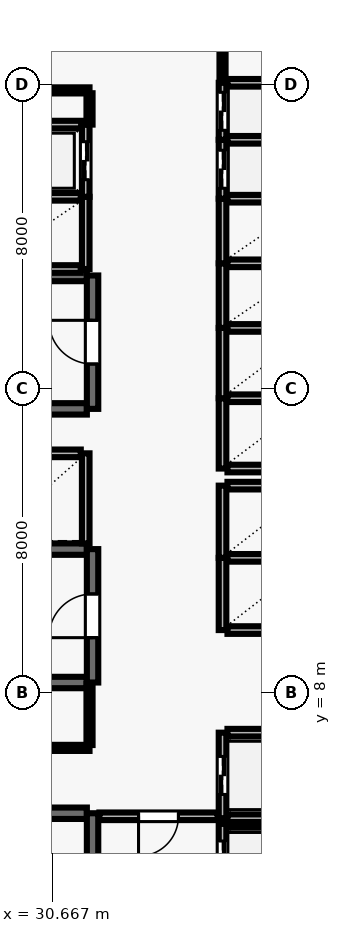
"""IFC4 building model, lengths in metres.
Left out: names, types, materials, properties, quantities, classifications, styles, units other than length and angle.
Written with IfcOpenShell. Run it as: python <this file> out.ifc"""

import sys

from ifc_helpers import new_model, si_unit, direction, frame, frame_2d, origin, place, context, subcontext, project, spatial, rectangle, extrude, element, fill, save


model = new_model("IFC4")
c1 = context("Model", 3, precision=1e-05, world=origin(), true_north=direction((0.0, 1.0)))
c2 = subcontext(c1, "Body", "Model", "MODEL_VIEW")
j1 = project(units=[si_unit("LENGTHUNIT", "METRE"), si_unit("PLANEANGLEUNIT", "RADIAN")], contexts=[c1])
p1 = place(None, origin())
s1 = spatial("IfcSite", under=j1, at=p1, CompositionType="ELEMENT")
p2 = place(p1, origin())
s2 = spatial("IfcBuilding", under=s1, at=p2, CompositionType="ELEMENT")
p3 = place(p2, frame((0.0, 0.0, 46.6)))
s3 = spatial("IfcBuildingStorey", under=s2, at=p3, CompositionType="ELEMENT", Elevation=46.6)
p4 = place(p3, frame((31.58, 4.83, 0.0), z_axis=(0.0, 0.0, 1.0), x_axis=(-1.0, 0.0, 0.0)))
e1 = element("IfcWall", 1, at=p4, inside=s3, PredefinedType="SHEAR", context=c2, shape_type="SweptSolid", body=[
    extrude(rectangle(XDim=8.36, YDim=0.3, at=frame_2d((4.18, 0.0))), origin(), (0.0, 0.0, 1.0), 3.69),
])
p5 = place(p3, frame((31.73, 0.96, 0.0), z_axis=(0.0, 0.0, 1.0), x_axis=(0.0, 1.0, 0.0)))
e2 = element("IfcWall", 2, at=p5, inside=s3, PredefinedType="SHEAR", context=c2, shape_type="SweptSolid", body=[
    extrude(rectangle(XDim=3.87, YDim=0.3, at=frame_2d((1.935, 0.0))), origin(), (0.0, 0.0, 1.0), 3.69),
])
p6 = place(p5, frame((1.54, 0.0, 0.0)))
e3 = element("IfcOpeningElement", 3, at=p6, cuts=e2, PredefinedType="OPENING", context=c2, shape_type="SweptSolid", body=[
    extrude(rectangle(XDim=1.15, YDim=2.15, at=frame_2d((0.575, 1.075))), frame((0.0, 0.16, 0.0), z_axis=(0.0, -1.0, 0.0), x_axis=(1.0, 0.0, 0.0)), (0.0, 0.0, 1.0), 0.32),
])
for number, where, z_axis, x_axis in (
    (4, (31.58, 18.98, 0.0), (0.0, 0.0, 1.0), (-1.0, 0.0, 0.0)),
    (5, (23.22, 15.47, 0.0), (0.0, 0.0, 1.0), (1.0, 0.0, 0.0)),
):
    element("IfcWall", number, at=place(p3, frame(where, z_axis=z_axis, x_axis=x_axis)), inside=s3, PredefinedType="SHEAR", context=c2, shape_type="SweptSolid", body=[
        extrude(rectangle(XDim=8.36, YDim=0.3, at=frame_2d((4.18, 0.0))), origin(), (0.0, 0.0, 1.0), 3.69),
    ])
p7 = place(p3, frame((31.73, 15.47, 0.0), z_axis=(0.0, 0.0, 1.0), x_axis=(0.0, 1.0, 0.0)))
e6 = element("IfcWall", 6, at=p7, inside=s3, PredefinedType="SHEAR", context=c2, shape_type="SweptSolid", body=[
    extrude(rectangle(XDim=3.51, YDim=0.3, at=frame_2d((1.755, 0.0))), origin(), (0.0, 0.0, 1.0), 3.69),
])
p8 = place(p7, frame((1.18, 0.0, 0.0)))
e7 = element("IfcOpeningElement", 7, at=p8, cuts=e6, PredefinedType="OPENING", context=c2, shape_type="SweptSolid", body=[
    extrude(rectangle(XDim=1.15, YDim=2.15, at=frame_2d((0.575, 1.075))), frame((0.0, 0.16, 0.0), z_axis=(0.0, -1.0, 0.0), x_axis=(1.0, 0.0, 0.0)), (0.0, 0.0, 1.0), 0.32),
])
for number, where, z_axis, x_axis in (
    (8, (31.58, 11.78, 0.0), (0.0, 0.0, 1.0), (-1.0, 0.0, 0.0)),
    (9, (23.22, 8.27, 0.0), (0.0, 0.0, 1.0), (1.0, 0.0, 0.0)),
):
    element("IfcWall", number, at=place(p3, frame(where, z_axis=z_axis, x_axis=x_axis)), inside=s3, PredefinedType="SHEAR", context=c2, shape_type="SweptSolid", body=[
        extrude(rectangle(XDim=8.36, YDim=0.3, at=frame_2d((4.18, 0.0))), origin(), (0.0, 0.0, 1.0), 3.69),
    ])
p9 = place(p3, frame((31.73, 8.27, 0.0), z_axis=(0.0, 0.0, 1.0), x_axis=(0.0, 1.0, 0.0)))
e10 = element("IfcWall", 10, at=p9, inside=s3, PredefinedType="SHEAR", context=c2, shape_type="SweptSolid", body=[
    extrude(rectangle(XDim=3.51, YDim=0.3, at=frame_2d((1.755, 0.0))), origin(), (0.0, 0.0, 1.0), 3.69),
])
p10 = place(p9, frame((1.18, 0.0, 0.0)))
e11 = element("IfcOpeningElement", 11, at=p10, cuts=e10, PredefinedType="OPENING", context=c2, shape_type="SweptSolid", body=[
    extrude(rectangle(XDim=1.15, YDim=2.15, at=frame_2d((0.575, 1.075))), frame((0.0, 0.16, 0.0), z_axis=(0.0, -1.0, 0.0), x_axis=(1.0, 0.0, 0.0)), (0.0, 0.0, 1.0), 0.32),
])
p11 = place(p3, frame((35.15, 4.55, 0.0), z_axis=(0.0, 0.0, 1.0), x_axis=(0.0, -1.0, 0.0)))
e12 = element("IfcWall", 12, at=p11, inside=s3, PredefinedType="SOLIDWALL", context=c2, shape_type="SweptSolid", body=[
    extrude(rectangle(XDim=2.1, YDim=0.2, at=frame_2d((1.05, 0.0))), origin(), (0.0, 0.0, 1.0), 3.69),
])
p12 = place(p11, frame((0.45, 0.0, 0.0)))
e13 = element("IfcOpeningElement", 13, at=p12, cuts=e12, PredefinedType="OPENING", context=c2, shape_type="SweptSolid", body=[
    extrude(rectangle(XDim=1.2, YDim=2.15, at=frame_2d((0.6, 1.075))), frame((0.0, 0.11, 0.0), z_axis=(0.0, -1.0, 0.0), x_axis=(1.0, 0.0, 0.0)), (0.0, 0.0, 1.0), 0.22),
])
p13 = place(p3, frame((37.42, 4.55, 0.0), z_axis=(0.0, 0.0, 1.0), x_axis=(-1.0, 0.0, 0.0)))
e14 = element("IfcWall", 14, at=p13, inside=s3, PredefinedType="SOLIDWALL", context=c2, shape_type="SweptSolid", body=[
    extrude(rectangle(XDim=2.14, YDim=0.2, at=frame_2d((1.07, 0.0))), origin(), (0.0, 0.0, 1.0), 3.69),
])
p14 = place(p3, frame((35.15, 6.95, 0.0), z_axis=(0.0, 0.0, 1.0), x_axis=(0.0, -1.0, 0.0)))
e15 = element("IfcWall", 15, at=p14, inside=s3, PredefinedType="SOLIDWALL", context=c2, shape_type="SweptSolid", body=[
    extrude(rectangle(XDim=2.25, YDim=0.2, at=frame_2d((1.125, 0.0))), origin(), (0.0, 0.0, 1.0), 3.69),
])
p15 = place(p14, frame((0.625, 0.0, 0.0)))
e16 = element("IfcOpeningElement", 16, at=p15, cuts=e15, PredefinedType="OPENING", context=c2, shape_type="SweptSolid", body=[
    extrude(rectangle(XDim=1.0, YDim=2.1, at=frame_2d((0.5, 1.05))), frame((0.0, 0.11, 0.0), z_axis=(0.0, -1.0, 0.0), x_axis=(1.0, 0.0, 0.0)), (0.0, 0.0, 1.0), 0.22),
])
for number, where, z_axis, x_axis in (
    (17, (35.28, 4.7, 0.0), (0.0, 0.0, 1.0), (1.0, 0.0, 0.0)),
    (18, (37.42, 6.95, 0.0), (0.0, 0.0, 1.0), (-1.0, 0.0, 0.0)),
):
    element("IfcWall", number, at=place(p3, frame(where, z_axis=z_axis, x_axis=x_axis)), inside=s3, PredefinedType="SOLIDWALL", context=c2, shape_type="SweptSolid", body=[
        extrude(rectangle(XDim=2.14, YDim=0.2, at=frame_2d((1.07, 0.0))), origin(), (0.0, 0.0, 1.0), 3.69),
    ])
p16 = place(p3, frame((35.15, 11.55, 0.0), z_axis=(0.0, 0.0, 1.0), x_axis=(0.0, -1.0, 0.0)))
e19 = element("IfcWall", 19, at=p16, inside=s3, PredefinedType="SOLIDWALL", context=c2, shape_type="SweptSolid", body=[
    extrude(rectangle(XDim=1.9, YDim=0.2, at=frame_2d((0.95, 0.0))), origin(), (0.0, 0.0, 1.0), 3.69),
])
for number, where, z_axis, x_axis in (
    (20, (35.28, 9.65, 0.0), (0.0, 0.0, 1.0), (1.0, 0.0, 0.0)),
    (21, (37.42, 11.55, 0.0), (0.0, 0.0, 1.0), (-1.0, 0.0, 0.0)),
):
    element("IfcWall", number, at=place(p3, frame(where, z_axis=z_axis, x_axis=x_axis)), inside=s3, PredefinedType="SOLIDWALL", context=c2, shape_type="SweptSolid", body=[
        extrude(rectangle(XDim=2.14, YDim=0.2, at=frame_2d((1.07, 0.0))), origin(), (0.0, 0.0, 1.0), 3.69),
    ])
p17 = place(p3, frame((35.15, 13.45, 0.0), z_axis=(0.0, 0.0, 1.0), x_axis=(0.0, -1.0, 0.0)))
e22 = element("IfcWall", 22, at=p17, inside=s3, PredefinedType="SOLIDWALL", context=c2, shape_type="SweptSolid", body=[
    extrude(rectangle(XDim=1.9, YDim=0.2, at=frame_2d((0.95, 0.0))), origin(), (0.0, 0.0, 1.0), 3.69),
])
p18 = place(p3, frame((37.42, 13.45, 0.0), z_axis=(0.0, 0.0, 1.0), x_axis=(-1.0, 0.0, 0.0)))
e23 = element("IfcWall", 23, at=p18, inside=s3, PredefinedType="SOLIDWALL", context=c2, shape_type="SweptSolid", body=[
    extrude(rectangle(XDim=2.14, YDim=0.2, at=frame_2d((1.07, 0.0))), origin(), (0.0, 0.0, 1.0), 3.69),
])
p19 = place(p3, frame((31.55, 11.93, 0.0), z_axis=(0.0, 0.0, 1.0), x_axis=(0.0, 1.0, 0.0)))
e24 = element("IfcWall", 24, at=p19, inside=s3, PredefinedType="SOLIDWALL", context=c2, shape_type="SweptSolid", body=[
    extrude(rectangle(XDim=2.37, YDim=0.2, at=frame_2d((1.185, 0.0))), origin(), (0.0, 0.0, 1.0), 3.69),
])
p20 = place(p3, frame((31.42, 14.3, 0.0), z_axis=(0.0, 0.0, 1.0), x_axis=(-1.0, 0.0, 0.0)))
e25 = element("IfcWall", 25, at=p20, inside=s3, PredefinedType="SOLIDWALL", context=c2, shape_type="SweptSolid", body=[
    extrude(rectangle(XDim=2.44, YDim=0.2, at=frame_2d((1.22, 0.0))), origin(), (0.0, 0.0, 1.0), 3.69),
])
p21 = place(p3, frame((35.15, 15.75, 0.0), z_axis=(0.0, 0.0, 1.0), x_axis=(0.0, -1.0, 0.0)))
e26 = element("IfcWall", 26, at=p21, inside=s3, PredefinedType="SOLIDWALL", context=c2, shape_type="SweptSolid", body=[
    extrude(rectangle(XDim=1.85, YDim=0.2, at=frame_2d((0.925, 0.0))), origin(), (0.0, 0.0, 1.0), 3.69),
])
for number, where, z_axis, x_axis in (
    (27, (35.28, 13.9, 0.0), (0.0, 0.0, 1.0), (1.0, 0.0, 0.0)),
    (28, (37.42, 15.75, 0.0), (0.0, 0.0, 1.0), (-1.0, 0.0, 0.0)),
):
    element("IfcWall", number, at=place(p3, frame(where, z_axis=z_axis, x_axis=x_axis)), inside=s3, PredefinedType="SOLIDWALL", context=c2, shape_type="SweptSolid", body=[
        extrude(rectangle(XDim=2.14, YDim=0.2, at=frame_2d((1.07, 0.0))), origin(), (0.0, 0.0, 1.0), 3.69),
    ])
p22 = place(p3, frame((35.15, 17.6, 0.0), z_axis=(0.0, 0.0, 1.0), x_axis=(0.0, -1.0, 0.0)))
e29 = element("IfcWall", 29, at=p22, inside=s3, PredefinedType="SOLIDWALL", context=c2, shape_type="SweptSolid", body=[
    extrude(rectangle(XDim=1.85, YDim=0.2, at=frame_2d((0.925, 0.0))), origin(), (0.0, 0.0, 1.0), 3.69),
])
p23 = place(p3, frame((37.42, 17.6, 0.0), z_axis=(0.0, 0.0, 1.0), x_axis=(-1.0, 0.0, 0.0)))
e30 = element("IfcWall", 30, at=p23, inside=s3, PredefinedType="SOLIDWALL", context=c2, shape_type="SweptSolid", body=[
    extrude(rectangle(XDim=2.14, YDim=0.2, at=frame_2d((1.07, 0.0))), origin(), (0.0, 0.0, 1.0), 3.69),
])
p24 = place(p3, frame((35.15, 19.3, 0.0), z_axis=(0.0, 0.0, 1.0), x_axis=(0.0, -1.0, 0.0)))
e31 = element("IfcWall", 31, at=p24, inside=s3, PredefinedType="SOLIDWALL", context=c2, shape_type="SweptSolid", body=[
    extrude(rectangle(XDim=1.7, YDim=0.2, at=frame_2d((0.85, 0.0))), origin(), (0.0, 0.0, 1.0), 3.69),
])
p25 = place(p3, frame((37.42, 19.3, 0.0), z_axis=(0.0, 0.0, 1.0), x_axis=(-1.0, 0.0, 0.0)))
e32 = element("IfcWall", 32, at=p25, inside=s3, PredefinedType="SOLIDWALL", context=c2, shape_type="SweptSolid", body=[
    extrude(rectangle(XDim=2.14, YDim=0.2, at=frame_2d((1.07, 0.0))), origin(), (0.0, 0.0, 1.0), 3.69),
])
p26 = place(p3, frame((35.15, 21.0, 0.0), z_axis=(0.0, 0.0, 1.0), x_axis=(0.0, -1.0, 0.0)))
e33 = element("IfcWall", 33, at=p26, inside=s3, PredefinedType="SOLIDWALL", context=c2, shape_type="SweptSolid", body=[
    extrude(rectangle(XDim=1.7, YDim=0.2, at=frame_2d((0.85, 0.0))), origin(), (0.0, 0.0, 1.0), 3.69),
])
p27 = place(p3, frame((37.42, 21.0, 0.0), z_axis=(0.0, 0.0, 1.0), x_axis=(-1.0, 0.0, 0.0)))
e34 = element("IfcWall", 34, at=p27, inside=s3, PredefinedType="SOLIDWALL", context=c2, shape_type="SweptSolid", body=[
    extrude(rectangle(XDim=2.14, YDim=0.2, at=frame_2d((1.07, 0.0))), origin(), (0.0, 0.0, 1.0), 3.69),
])
p28 = place(p3, frame((31.55, 19.15, 0.0), z_axis=(0.0, 0.0, 1.0), x_axis=(0.0, 1.0, 0.0)))
e35 = element("IfcWall", 35, at=p28, inside=s3, PredefinedType="SOLIDWALL", context=c2, shape_type="SweptSolid", body=[
    extrude(rectangle(XDim=1.9, YDim=0.2, at=frame_2d((0.95, 0.0))), origin(), (0.0, 0.0, 1.0), 3.69),
])
for number, where, z_axis, x_axis in (
    (36, (28.98, 19.15, 0.0), (0.0, 0.0, 1.0), (1.0, 0.0, 0.0)),
    (37, (31.42, 21.05, 0.0), (0.0, 0.0, 1.0), (-1.0, 0.0, 0.0)),
):
    element("IfcWall", number, at=place(p3, frame(where, z_axis=z_axis, x_axis=x_axis)), inside=s3, PredefinedType="SOLIDWALL", context=c2, shape_type="SweptSolid", body=[
        extrude(rectangle(XDim=2.44, YDim=0.2, at=frame_2d((1.22, 0.0))), origin(), (0.0, 0.0, 1.0), 3.69),
    ])
p29 = place(p3, frame((35.15, 22.55, 0.0), z_axis=(0.0, 0.0, 1.0), x_axis=(0.0, -1.0, 0.0)))
e38 = element("IfcWall", 38, at=p29, inside=s3, PredefinedType="SOLIDWALL", context=c2, shape_type="SweptSolid", body=[
    extrude(rectangle(XDim=1.55, YDim=0.2, at=frame_2d((0.775, 0.0))), origin(), (0.0, 0.0, 1.0), 3.69),
])
p30 = place(p29, frame((0.275, 0.0, 0.0)))
e39 = element("IfcOpeningElement", 39, at=p30, cuts=e38, PredefinedType="OPENING", context=c2, shape_type="SweptSolid", body=[
    extrude(rectangle(XDim=1.0, YDim=2.1, at=frame_2d((0.5, 1.05))), frame((0.0, 0.11, 0.0), z_axis=(0.0, -1.0, 0.0), x_axis=(1.0, 0.0, 0.0)), (0.0, 0.0, 1.0), 0.22),
])
p31 = place(p3, frame((37.42, 22.55, 0.0), z_axis=(0.0, 0.0, 1.0), x_axis=(-1.0, 0.0, 0.0)))
e40 = element("IfcWall", 40, at=p31, inside=s3, PredefinedType="SOLIDWALL", context=c2, shape_type="SweptSolid", body=[
    extrude(rectangle(XDim=2.14, YDim=0.2, at=frame_2d((1.07, 0.0))), origin(), (0.0, 0.0, 1.0), 3.69),
])
p32 = place(p3, frame((35.15, 24.05, 0.0), z_axis=(0.0, 0.0, 1.0), x_axis=(0.0, -1.0, 0.0)))
e41 = element("IfcWall", 41, at=p32, inside=s3, PredefinedType="SOLIDWALL", context=c2, shape_type="SweptSolid", body=[
    extrude(rectangle(XDim=1.5, YDim=0.2, at=frame_2d((0.75, 0.0))), origin(), (0.0, 0.0, 1.0), 3.69),
])
p33 = place(p32, frame((0.25, 0.0, 0.0)))
e42 = element("IfcOpeningElement", 42, at=p33, cuts=e41, PredefinedType="OPENING", context=c2, shape_type="SweptSolid", body=[
    extrude(rectangle(XDim=1.0, YDim=2.1, at=frame_2d((0.5, 1.05))), frame((0.0, 0.11, 0.0), z_axis=(0.0, -1.0, 0.0), x_axis=(1.0, 0.0, 0.0)), (0.0, 0.0, 1.0), 0.22),
])
p34 = place(p3, frame((37.42, 24.05, 0.0), z_axis=(0.0, 0.0, 1.0), x_axis=(-1.0, 0.0, 0.0)))
e43 = element("IfcWall", 43, at=p34, inside=s3, PredefinedType="SOLIDWALL", context=c2, shape_type="SweptSolid", body=[
    extrude(rectangle(XDim=2.14, YDim=0.2, at=frame_2d((1.07, 0.0))), origin(), (0.0, 0.0, 1.0), 3.69),
])
p35 = place(p3, frame((31.55, 21.05, 0.0), z_axis=(0.0, 0.0, 1.0), x_axis=(0.0, 1.0, 0.0)))
e44 = element("IfcWall", 44, at=p35, inside=s3, PredefinedType="SOLIDWALL", context=c2, shape_type="SweptSolid", body=[
    extrude(rectangle(XDim=1.9, YDim=0.2, at=frame_2d((0.95, 0.0))), origin(), (0.0, 0.0, 1.0), 3.69),
])
p36 = place(p35, frame((0.45, 0.0, 0.0)))
e45 = element("IfcOpeningElement", 45, at=p36, cuts=e44, PredefinedType="OPENING", context=c2, shape_type="SweptSolid", body=[
    extrude(rectangle(XDim=1.0, YDim=2.1, at=frame_2d((0.5, 1.05))), frame((0.0, 0.11, 0.0), z_axis=(0.0, -1.0, 0.0), x_axis=(1.0, 0.0, 0.0)), (0.0, 0.0, 1.0), 0.22),
])
p37 = place(p3, frame((31.43, 22.95, 0.0), z_axis=(0.0, 0.0, 1.0), x_axis=(-1.0, 0.0, 0.0)))
e46 = element("IfcWall", 46, at=p37, inside=s3, PredefinedType="SOLIDWALL", context=c2, shape_type="SweptSolid", body=[
    extrude(rectangle(XDim=2.46, YDim=0.2, at=frame_2d((1.23, 0.0))), origin(), (0.0, 0.0, 1.0), 3.69),
])
p38 = place(p3, frame((28.8, 23.85, 0.0), z_axis=(0.0, 0.0, 1.0), x_axis=(1.0, 0.0, 0.0)))
e47 = element("IfcWall", 47, at=p38, inside=s3, PredefinedType="PARTITIONING", context=c2, shape_type="SweptSolid", body=[
    extrude(rectangle(XDim=2.85, YDim=0.16, at=frame_2d((1.425, 0.0))), origin(), (0.0, 0.0, 1.0), 3.69),
])
p39 = place(p3, frame((31.65, 6.55, 0.0), z_axis=(0.0, 0.0, 1.0), x_axis=(-1.0, 0.0, 0.0)))
e48 = element("IfcWall", 48, at=p39, inside=s3, PredefinedType="PARTITIONING", context=c2, shape_type="SweptSolid", body=[
    extrude(rectangle(XDim=4.75, YDim=0.16, at=frame_2d((2.375, 0.0))), origin(), (0.0, 0.0, 1.0), 3.69),
])
p40 = place(p39, frame((1.935, 0.0, 0.0)))
e49 = element("IfcOpeningElement", 49, at=p40, cuts=e48, PredefinedType="OPENING", context=c2, shape_type="SweptSolid", body=[
    extrude(rectangle(XDim=0.88, YDim=2.1, at=frame_2d((0.44, 1.05))), frame((0.0, 0.09, 0.0), z_axis=(0.0, -1.0, 0.0), x_axis=(1.0, 0.0, 0.0)), (0.0, 0.0, 1.0), 0.18),
])
p41 = place(p3, frame((35.02, 4.75, 0.0), z_axis=(0.0, 0.0, 1.0), x_axis=(-1.0, 0.0, 0.0)))
e50 = element("IfcWall", 50, at=p41, inside=s3, PredefinedType="SOLIDWALL", context=c2, shape_type="SweptSolid", body=[
    extrude(rectangle(XDim=3.11, YDim=0.2, at=frame_2d((1.555, 0.0))), origin(), (0.0, 0.0, 1.0), 3.69),
])
p42 = place(p41, frame((1.03, 0.0, 0.0)))
e51 = element("IfcOpeningElement", 51, at=p42, cuts=e50, PredefinedType="OPENING", context=c2, shape_type="SweptSolid", body=[
    extrude(rectangle(XDim=1.05, YDim=2.15, at=frame_2d((0.525, 1.075))), frame((0.0, 0.11, 0.0), z_axis=(0.0, -1.0, 0.0), x_axis=(1.0, 0.0, 0.0)), (0.0, 0.0, 1.0), 0.22),
])
p43 = place(p3, frame((31.65, 8.24, 0.0), z_axis=(0.0, 0.0, 1.0), x_axis=(0.0, -1.0, 0.0)))
e52 = element("IfcWall", 52, at=p43, inside=s3, PredefinedType="PARTITIONING", context=c2, shape_type="SweptSolid", body=[
    extrude(rectangle(XDim=1.615, YDim=0.16, at=frame_2d((0.808, 0.0))), origin(), (0.0, 0.0, 1.0), 3.69),
])
p44 = place(p3, frame((31.65, 23.775, 0.0), z_axis=(0.0, 0.0, 1.0), x_axis=(0.0, -1.0, 0.0)))
e53 = element("IfcWall", 53, at=p44, inside=s3, PredefinedType="PARTITIONING", context=c2, shape_type="SweptSolid", body=[
    extrude(rectangle(XDim=0.825, YDim=0.16, at=frame_2d((0.413, 0.0))), origin(), (0.0, 0.0, 1.0), 3.69),
])
p45 = place(p3, frame((35.15, 24.07, 0.0), z_axis=(0.0, 0.0, 1.0), x_axis=(0.0, 1.0, 0.0)))
e54 = element("IfcWall", 54, at=p45, inside=s3, PredefinedType="PARTITIONING", context=c2, shape_type="SweptSolid", body=[
    extrude(rectangle(XDim=1.855, YDim=0.16, at=frame_2d((0.927, 0.0))), origin(), (0.0, 0.0, 1.0), 3.69),
])
p46 = place(p8, origin())
e55 = element("IfcDoor", 55, at=p46, inside=s3, OperationType="SINGLE_SWING_RIGHT", PredefinedType="DOOR", context=c2, shape_type="SweptSolid", body=[
    extrude(rectangle(XDim=1.15, YDim=2.15, at=frame_2d((0.575, 1.075))), frame((0.0, 0.025, 0.0), z_axis=(0.0, -1.0, 0.0), x_axis=(1.0, 0.0, 0.0)), (0.0, 0.0, 1.0), 0.05),
])
fill(e7, e55)
p47 = place(p10, origin())
e56 = element("IfcDoor", 56, at=p47, inside=s3, OperationType="SINGLE_SWING_LEFT", PredefinedType="DOOR", context=c2, shape_type="SweptSolid", body=[
    extrude(rectangle(XDim=1.15, YDim=2.15, at=frame_2d((0.575, 1.075))), frame((0.0, 0.025, 0.0), z_axis=(0.0, -1.0, 0.0), x_axis=(1.0, 0.0, 0.0)), (0.0, 0.0, 1.0), 0.05),
])
fill(e11, e56)
p48 = place(p12, origin())
e57 = element("IfcDoor", 57, at=p48, inside=s3, OperationType="DOUBLE_DOOR_SLIDING", PredefinedType="DOOR", context=c2, shape_type="SweptSolid", body=[
    extrude(rectangle(XDim=1.2, YDim=2.15, at=frame_2d((0.6, 1.075))), frame((0.0, 0.025, 0.0), z_axis=(0.0, -1.0, 0.0), x_axis=(1.0, 0.0, 0.0)), (0.0, 0.0, 1.0), 0.05),
])
fill(e13, e57)
p49 = place(p15, origin())
e58 = element("IfcDoor", 58, at=p49, inside=s3, OperationType="DOUBLE_DOOR_SLIDING", PredefinedType="DOOR", context=c2, shape_type="SweptSolid", body=[
    extrude(rectangle(XDim=1.0, YDim=2.1, at=frame_2d((0.5, 1.05))), frame((0.0, 0.025, 0.0), z_axis=(0.0, -1.0, 0.0), x_axis=(1.0, 0.0, 0.0)), (0.0, 0.0, 1.0), 0.05),
])
fill(e16, e58)
p50 = place(p30, origin())
e59 = element("IfcDoor", 59, at=p50, inside=s3, OperationType="DOUBLE_DOOR_SLIDING", PredefinedType="DOOR", context=c2, shape_type="SweptSolid", body=[
    extrude(rectangle(XDim=1.0, YDim=2.1, at=frame_2d((0.5, 1.05))), frame((0.0, 0.025, 0.0), z_axis=(0.0, -1.0, 0.0), x_axis=(1.0, 0.0, 0.0)), (0.0, 0.0, 1.0), 0.05),
])
fill(e39, e59)
p51 = place(p33, origin())
e60 = element("IfcDoor", 60, at=p51, inside=s3, OperationType="DOUBLE_DOOR_SLIDING", PredefinedType="DOOR", context=c2, shape_type="SweptSolid", body=[
    extrude(rectangle(XDim=1.0, YDim=2.1, at=frame_2d((0.5, 1.05))), frame((0.0, 0.025, 0.0), z_axis=(0.0, -1.0, 0.0), x_axis=(1.0, 0.0, 0.0)), (0.0, 0.0, 1.0), 0.05),
])
fill(e42, e60)
p52 = place(p36, origin())
e61 = element("IfcDoor", 61, at=p52, inside=s3, OperationType="DOUBLE_DOOR_SLIDING", PredefinedType="DOOR", context=c2, shape_type="SweptSolid", body=[
    extrude(rectangle(XDim=1.0, YDim=2.1, at=frame_2d((0.5, 1.05))), frame((0.0, 0.025, 0.0), z_axis=(0.0, -1.0, 0.0), x_axis=(1.0, 0.0, 0.0)), (0.0, 0.0, 1.0), 0.05),
])
fill(e45, e61)
p53 = place(p42, origin())
e62 = element("IfcDoor", 62, at=p53, inside=s3, OperationType="SINGLE_SWING_RIGHT", PredefinedType="DOOR", context=c2, shape_type="SweptSolid", body=[
    extrude(rectangle(XDim=1.05, YDim=2.15, at=frame_2d((0.525, 1.075))), frame((0.0, 0.025, 0.0), z_axis=(0.0, -1.0, 0.0), x_axis=(1.0, 0.0, 0.0)), (0.0, 0.0, 1.0), 0.05),
])
fill(e51, e62)
save(model, sys.argv[1])
